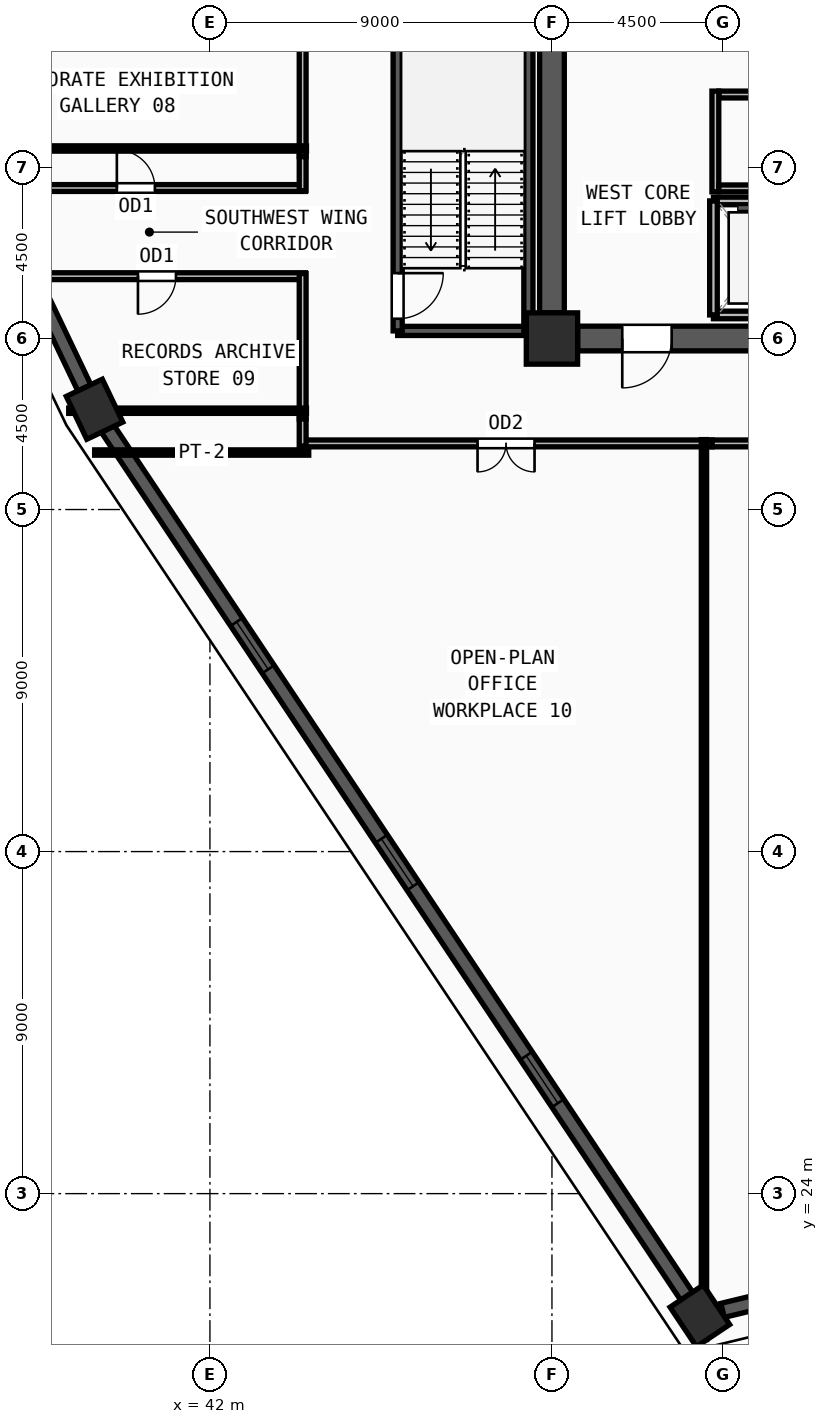
"""IFC4 building model, lengths in metres.
Left out: names, types, materials, properties, quantities, classifications, styles, units other than length and angle.
Written with IfcOpenShell. Run it as: python <this file> out.ifc"""

import sys

from ifc_helpers import new_model, si_unit, direction, frame, frame_2d, origin, origin_2d, place, context, subcontext, project, spatial, rectangle, extrude, source, transform, mapped, element, fill, save


model = new_model("IFC4")
c1 = context("Model", 3, precision=1e-05, world=origin(), true_north=direction((0.0, 1.0)))
c2 = subcontext(c1, "Body", "Model", "MODEL_VIEW")
j1 = project(units=[si_unit("LENGTHUNIT", "METRE"), si_unit("PLANEANGLEUNIT", "RADIAN")], contexts=[c1])
p1 = place(None, origin())
s1 = spatial("IfcSite", under=j1, at=p1, CompositionType="ELEMENT")
p2 = place(p1, origin())
s2 = spatial("IfcBuilding", under=s1, at=p2, CompositionType="ELEMENT")
p3 = place(p2, frame((0.0, 0.0, 270.0)))
s3 = spatial("IfcBuildingStorey", under=s2, at=p3, CompositionType="ELEMENT", Elevation=270.0)
m1 = source(origin(), c2, "Body", "SweptSolid", [
    extrude(rectangle(XDim=1.35, YDim=1.35, at=origin_2d()), origin(), (0.0, 0.0, 1.0), 3.75),
])
p4 = place(p3, frame((51.0, 46.5, 0.0), z_axis=(0.0, 0.0, 1.0), x_axis=(1.0, 0.0, 0.0)))
e1 = element("IfcColumn", 1, at=p4, inside=s3, PredefinedType="COLUMN", context=c2, shape_type="MappedRepresentation", body=[
    mapped(m1, transform((0.0, 0.0, 0.0), x_axis=(1.0, 0.0, 0.0), y_axis=(0.0, 1.0, 0.0), z_axis=(0.0, 0.0, 1.0), scale=1.0)),
])
m2 = source(origin(), c2, "Body", "SweptSolid", [
    extrude(rectangle(XDim=1.25, YDim=1.05, at=origin_2d()), origin(), (0.0, 0.0, 1.0), 3.75),
])
for number, where, z_axis, x_axis in (
    (2, (54.892, 20.784, 0.0), (0.0, 0.0, 1.0), (-0.555, 0.832, 0.0)),
    (3, (38.964, 44.639, 0.0), (0.0, 0.0, 1.0), (-0.431, 0.902, 0.0)),
):
    element("IfcColumn", number, at=place(p3, frame(where, z_axis=z_axis, x_axis=x_axis)), inside=s3, PredefinedType="COLUMN", context=c2, shape_type="MappedRepresentation", body=[
        mapped(m2, transform((0.0, 0.0, 0.0), x_axis=(1.0, 0.0, 0.0), y_axis=(0.0, 1.0, 0.0), z_axis=(0.0, 0.0, 1.0), scale=1.0)),
    ])
p5 = place(p3, frame((28.939, 65.624, 0.0), z_axis=(0.0, 0.0, 1.0), x_axis=(0.431066278959, -0.902320266393, 0.0)))
e4 = element("IfcWall", 4, at=p5, inside=s3, PredefinedType="SOLIDWALL", context=c2, shape_type="SweptSolid", body=[
    extrude(rectangle(XDim=22.642, YDim=0.38, at=frame_2d((11.321, 0.0))), origin(), (0.0, 0.0, 1.0), 3.57),
])
m3 = source(origin(), c2, "Body", "SweptSolid", [
    extrude(rectangle(XDim=1.5, YDim=1.9, at=frame_2d((0.75, 0.95))), frame((0.0, 0.2, 0.0), z_axis=(0.0, -1.0, 0.0), x_axis=(1.0, 0.0, 0.0)), (0.0, 0.0, 1.0), 0.4),
])
p6 = place(p5, frame((4.06, 0.0, 0.55)))
e5 = element("IfcOpeningElement", 5, at=p6, cuts=e4, PredefinedType="OPENING", context=c2, shape_type="MappedRepresentation", body=[
    mapped(m3, transform((0.0, 0.0, 0.0), x_axis=(1.0, 0.0, 0.0), y_axis=(0.0, 1.0, 0.0), z_axis=(0.0, 0.0, 1.0), scale=1.0)),
])
p7 = place(p5, frame((10.571, 0.0, 0.55)))
e6 = element("IfcOpeningElement", 6, at=p7, cuts=e4, PredefinedType="OPENING", context=c2, shape_type="MappedRepresentation", body=[
    mapped(m3, transform((0.0, 0.0, 0.0), x_axis=(1.0, 0.0, 0.0), y_axis=(0.0, 1.0, 0.0), z_axis=(0.0, 0.0, 1.0), scale=1.0)),
])
p8 = place(p3, frame((39.306, 44.128, 0.0), z_axis=(0.0, 0.0, 1.0), x_axis=(0.555258257402, -0.831677983108, 0.0)))
e7 = element("IfcWall", 7, at=p8, inside=s3, PredefinedType="SOLIDWALL", context=c2, shape_type="SweptSolid", body=[
    extrude(rectangle(XDim=27.454, YDim=0.38, at=frame_2d((13.727, 0.0))), origin(), (0.0, 0.0, 1.0), 3.57),
])
p9 = place(p8, frame((6.114, 0.0, 0.55)))
e8 = element("IfcOpeningElement", 8, at=p9, cuts=e7, PredefinedType="OPENING", context=c2, shape_type="MappedRepresentation", body=[
    mapped(m3, transform((0.0, 0.0, 0.0), x_axis=(1.0, 0.0, 0.0), y_axis=(0.0, 1.0, 0.0), z_axis=(0.0, 0.0, 1.0), scale=1.0)),
])
p10 = place(p8, frame((12.977, 0.0, 0.55)))
e9 = element("IfcOpeningElement", 9, at=p10, cuts=e7, PredefinedType="OPENING", context=c2, shape_type="MappedRepresentation", body=[
    mapped(m3, transform((0.0, 0.0, 0.0), x_axis=(1.0, 0.0, 0.0), y_axis=(0.0, 1.0, 0.0), z_axis=(0.0, 0.0, 1.0), scale=1.0)),
])
p11 = place(p8, frame((19.841, 0.0, 0.55)))
e10 = element("IfcOpeningElement", 10, at=p11, cuts=e7, PredefinedType="OPENING", context=c2, shape_type="MappedRepresentation", body=[
    mapped(m3, transform((0.0, 0.0, 0.0), x_axis=(1.0, 0.0, 0.0), y_axis=(0.0, 1.0, 0.0), z_axis=(0.0, 0.0, 1.0), scale=1.0)),
])
p12 = place(p3, frame((55.49, 20.928, 0.0), z_axis=(0.0, 0.0, 1.0), x_axis=(0.972038774705, 0.234820400455, 0.0)))
e11 = element("IfcWall", 11, at=p12, inside=s3, PredefinedType="SOLIDWALL", context=c2, shape_type="SweptSolid", body=[
    extrude(rectangle(XDim=4.025, YDim=0.38, at=frame_2d((2.012, 0.0))), origin(), (0.0, 0.0, 1.0), 3.57),
])
m4 = source(origin(), c2, "Body", "SweptSolid", [
    extrude(rectangle(XDim=1.2, YDim=1.9, at=frame_2d((0.6, 0.95))), frame((0.0, 0.2, 0.0), z_axis=(0.0, -1.0, 0.0), x_axis=(1.0, 0.0, 0.0)), (0.0, 0.0, 1.0), 0.4),
])
p13 = place(p12, frame((1.412, 0.0, 0.55)))
e12 = element("IfcOpeningElement", 12, at=p13, cuts=e11, PredefinedType="OPENING", context=c2, shape_type="MappedRepresentation", body=[
    mapped(m4, transform((0.0, 0.0, 0.0), x_axis=(1.0, 0.0, 0.0), y_axis=(0.0, 1.0, 0.0), z_axis=(0.0, 0.0, 1.0), scale=1.0)),
])
p14 = place(p3, frame((59.325, 46.5, 0.0), z_axis=(0.0, 0.0, 1.0), x_axis=(-1.0, 0.0, 0.0)))
e13 = element("IfcWall", 13, at=p14, inside=s3, PredefinedType="SHEAR", context=c2, shape_type="SweptSolid", body=[
    extrude(rectangle(XDim=7.65, YDim=0.65, at=frame_2d((3.825, 0.0))), origin(), (0.0, 0.0, 1.0), 3.57),
])
m5 = source(origin(), c2, "Body", "SweptSolid", [
    extrude(rectangle(XDim=1.3, YDim=2.2, at=frame_2d((0.65, 1.1))), frame((0.0, 0.335, 0.0), z_axis=(0.0, -1.0, 0.0), x_axis=(1.0, 0.0, 0.0)), (0.0, 0.0, 1.0), 0.67),
])
p15 = place(p14, frame((5.175, 0.0, 0.0)))
e14 = element("IfcOpeningElement", 14, at=p15, cuts=e13, PredefinedType="OPENING", context=c2, shape_type="MappedRepresentation", body=[
    mapped(m5, transform((0.0, 0.0, 0.0), x_axis=(1.0, 0.0, 0.0), y_axis=(0.0, 1.0, 0.0), z_axis=(0.0, 0.0, 1.0), scale=1.0)),
])
m6 = source(origin(), c2, "Body", "SweptSolid", [
    extrude(rectangle(XDim=1.0, YDim=2.2, at=frame_2d((0.5, 1.1))), frame((0.0, 0.335, 0.0), z_axis=(0.0, -1.0, 0.0), x_axis=(1.0, 0.0, 0.0)), (0.0, 0.0, 1.0), 0.67),
])
p16 = place(p14, frame((0.675, 0.0, 0.0)))
e15 = element("IfcOpeningElement", 15, at=p16, cuts=e13, PredefinedType="OPENING", context=c2, shape_type="MappedRepresentation", body=[
    mapped(m6, transform((0.0, 0.0, 0.0), x_axis=(1.0, 0.0, 0.0), y_axis=(0.0, 1.0, 0.0), z_axis=(0.0, 0.0, 1.0), scale=1.0)),
])
p17 = place(p3, frame((51.0, 47.175, 0.0), z_axis=(0.0, 0.0, 1.0), x_axis=(0.0, 1.0, 0.0)))
e16 = element("IfcWall", 16, at=p17, inside=s3, PredefinedType="SHEAR", context=c2, shape_type="SweptSolid", body=[
    extrude(rectangle(XDim=13.65, YDim=0.65, at=frame_2d((6.825, 0.0))), origin(), (0.0, 0.0, 1.0), 3.57),
])
p18 = place(p3, frame((46.94, 46.7, 0.0), z_axis=(0.0, 0.0, 1.0), x_axis=(1.0, 0.0, 0.0)))
e17 = element("IfcWall", 17, at=p18, inside=s3, PredefinedType="SOLIDWALL", context=c2, shape_type="SweptSolid", body=[
    extrude(rectangle(XDim=3.44, YDim=0.24, at=frame_2d((1.72, 0.0))), origin(), (0.0, 0.0, 1.0), 3.57),
])
p19 = place(p3, frame((50.38, 46.7, 0.0), z_axis=(0.0, 0.0, 1.0), x_axis=(0.0, 1.0, 0.0)))
e18 = element("IfcWall", 18, at=p19, inside=s3, PredefinedType="SOLIDWALL", context=c2, shape_type="SweptSolid", body=[
    extrude(rectangle(XDim=7.82, YDim=0.24, at=frame_2d((3.91, 0.0))), origin(), (0.0, 0.0, 1.0), 3.57),
])
p20 = place(p3, frame((46.94, 54.52, 0.0), z_axis=(0.0, 0.0, 1.0), x_axis=(0.0, -1.0, 0.0)))
e19 = element("IfcWall", 19, at=p20, inside=s3, PredefinedType="SOLIDWALL", context=c2, shape_type="SweptSolid", body=[
    extrude(rectangle(XDim=7.82, YDim=0.24, at=frame_2d((3.91, 0.0))), origin(), (0.0, 0.0, 1.0), 3.57),
])
m7 = source(origin(), c2, "Body", "SweptSolid", [
    extrude(rectangle(XDim=1.2, YDim=2.2, at=frame_2d((0.6, 1.1))), frame((0.0, 0.13, 0.0), z_axis=(0.0, -1.0, 0.0), x_axis=(1.0, 0.0, 0.0)), (0.0, 0.0, 1.0), 0.26),
])
p21 = place(p20, frame((6.3, 0.0, 0.0)))
e20 = element("IfcOpeningElement", 20, at=p21, cuts=e19, PredefinedType="OPENING", context=c2, shape_type="MappedRepresentation", body=[
    mapped(m7, transform((0.0, 0.0, 0.0), x_axis=(1.0, 0.0, 0.0), y_axis=(0.0, 1.0, 0.0), z_axis=(0.0, 0.0, 1.0), scale=1.0)),
])
for number, where, z_axis, x_axis in (
    (21, (55.25, 47.12, 0.0), (0.0, 0.0, 1.0), (1.0, 0.0, 0.0)),
    (22, (57.65, 50.12, 0.0), (0.0, 0.0, 1.0), (-1.0, 0.0, 0.0)),
):
    element("IfcWall", number, at=place(p3, frame(where, z_axis=z_axis, x_axis=x_axis)), inside=s3, PredefinedType="SOLIDWALL", context=c2, shape_type="SweptSolid", body=[
        extrude(rectangle(XDim=2.4, YDim=0.2, at=frame_2d((1.2, 0.0))), origin(), (0.0, 0.0, 1.0), 3.57),
    ])
p22 = place(p3, frame((55.25, 50.12, 0.0), z_axis=(0.0, 0.0, 1.0), x_axis=(0.0, -1.0, 0.0)))
e23 = element("IfcWall", 23, at=p22, inside=s3, PredefinedType="SOLIDWALL", context=c2, shape_type="SweptSolid", body=[
    extrude(rectangle(XDim=3.0, YDim=0.2, at=frame_2d((1.5, 0.0))), origin(), (0.0, 0.0, 1.0), 3.57),
])
p23 = place(p3, frame((55.39, 52.92, 0.0), z_axis=(0.0, 0.0, 1.0), x_axis=(1.0, 0.0, 0.0)))
e24 = element("IfcWall", 24, at=p23, inside=s3, PredefinedType="PARTITIONING", context=c2, shape_type="SweptSolid", body=[
    extrude(rectangle(XDim=9.21, YDim=0.18, at=frame_2d((4.605, 0.0))), origin(), (0.0, 0.0, 1.0), 3.57),
])
m8 = source(origin(), c2, "Body", "SweptSolid", [
    extrude(rectangle(XDim=0.85, YDim=2.1, at=frame_2d((0.425, 1.05))), frame((0.0, 0.1, 0.0), z_axis=(0.0, -1.0, 0.0), x_axis=(1.0, 0.0, 0.0)), (0.0, 0.0, 1.0), 0.2),
])
p24 = place(p23, frame((4.185, 0.0, 0.0)))
e25 = element("IfcOpeningElement", 25, at=p24, cuts=e24, PredefinedType="OPENING", context=c2, shape_type="MappedRepresentation", body=[
    mapped(m8, transform((0.0, 0.0, 0.0), x_axis=(1.0, 0.0, 0.0), y_axis=(0.0, 1.0, 0.0), z_axis=(0.0, 0.0, 1.0), scale=1.0)),
])
p25 = place(p3, frame((44.44, 51.285, 0.0), z_axis=(0.0, 0.0, 1.0), x_axis=(0.0, 1.0, 0.0)))
e26 = element("IfcWall", 26, at=p25, inside=s3, PredefinedType="PARTITIONING", context=c2, shape_type="SweptSolid", body=[
    extrude(rectangle(XDim=8.0, YDim=0.18, at=frame_2d((4.0, 0.0))), origin(), (0.0, 0.0, 1.0), 3.205),
])
m9 = source(origin(), c2, "Body", "SweptSolid", [
    extrude(rectangle(XDim=1.0, YDim=2.2, at=frame_2d((0.5, 1.1))), frame((0.0, 0.1, 0.0), z_axis=(0.0, -1.0, 0.0), x_axis=(1.0, 0.0, 0.0)), (0.0, 0.0, 1.0), 0.2),
])
p26 = place(p25, frame((3.5, 0.0, 0.0)))
e27 = element("IfcOpeningElement", 27, at=p26, cuts=e26, PredefinedType="OPENING", context=c2, shape_type="MappedRepresentation", body=[
    mapped(m9, transform((0.0, 0.0, 0.0), x_axis=(1.0, 0.0, 0.0), y_axis=(0.0, 1.0, 0.0), z_axis=(0.0, 0.0, 1.0), scale=1.0)),
])
p27 = place(p3, frame((35.592, 50.46, 0.0), z_axis=(0.0, 0.0, 1.0), x_axis=(1.0, 0.0, 0.0)))
e28 = element("IfcWall", 28, at=p27, inside=s3, PredefinedType="PARTITIONING", context=c2, shape_type="SweptSolid", body=[
    extrude(rectangle(XDim=8.918, YDim=0.18, at=frame_2d((4.459, 0.0))), origin(), (0.0, 0.0, 1.0), 3.57),
])
p28 = place(p27, frame((3.959, 0.0, 0.0)))
e29 = element("IfcOpeningElement", 29, at=p28, cuts=e28, PredefinedType="OPENING", context=c2, shape_type="MappedRepresentation", body=[
    mapped(m9, transform((0.0, 0.0, 0.0), x_axis=(1.0, 0.0, 0.0), y_axis=(0.0, 1.0, 0.0), z_axis=(0.0, 0.0, 1.0), scale=1.0)),
])
p29 = place(p3, frame((44.51, 48.14, 0.0), z_axis=(0.0, 0.0, 1.0), x_axis=(-1.0, 0.0, 0.0)))
e30 = element("IfcWall", 30, at=p29, inside=s3, PredefinedType="PARTITIONING", context=c2, shape_type="SweptSolid", body=[
    extrude(rectangle(XDim=7.809, YDim=0.18, at=frame_2d((3.905, 0.0))), origin(), (0.0, 0.0, 1.0), 3.57),
])
p30 = place(p29, frame((3.404, 0.0, 0.0)))
e31 = element("IfcOpeningElement", 31, at=p30, cuts=e30, PredefinedType="OPENING", context=c2, shape_type="MappedRepresentation", body=[
    mapped(m9, transform((0.0, 0.0, 0.0), x_axis=(1.0, 0.0, 0.0), y_axis=(0.0, 1.0, 0.0), z_axis=(0.0, 0.0, 1.0), scale=1.0)),
])
p31 = place(p3, frame((55.215, 43.74, 0.0), z_axis=(0.0, 0.0, 1.0), x_axis=(-1.0, 0.0, 0.0)))
e32 = element("IfcWall", 32, at=p31, inside=s3, PredefinedType="PARTITIONING", context=c2, shape_type="SweptSolid", body=[
    extrude(rectangle(XDim=10.845, YDim=0.18, at=frame_2d((5.422, 0.0))), origin(), (0.0, 0.0, 1.0), 3.57),
])
m10 = source(origin(), c2, "Body", "SweptSolid", [
    extrude(rectangle(XDim=1.5, YDim=2.2, at=frame_2d((0.75, 1.1))), frame((0.0, 0.1, 0.0), z_axis=(0.0, -1.0, 0.0), x_axis=(1.0, 0.0, 0.0)), (0.0, 0.0, 1.0), 0.2),
])
p32 = place(p31, frame((4.673, 0.0, 0.0)))
e33 = element("IfcOpeningElement", 33, at=p32, cuts=e32, PredefinedType="OPENING", context=c2, shape_type="MappedRepresentation", body=[
    mapped(m10, transform((0.0, 0.0, 0.0), x_axis=(1.0, 0.0, 0.0), y_axis=(0.0, 1.0, 0.0), z_axis=(0.0, 0.0, 1.0), scale=1.0)),
])
p33 = place(p3, frame((75.63, 43.74, 0.0), z_axis=(0.0, 0.0, 1.0), x_axis=(-1.0, 0.0, 0.0)))
e34 = element("IfcWall", 34, at=p33, inside=s3, PredefinedType="PARTITIONING", context=c2, shape_type="SweptSolid", body=[
    extrude(rectangle(XDim=20.415, YDim=0.18, at=frame_2d((10.208, 0.0))), origin(), (0.0, 0.0, 1.0), 3.57),
])
p34 = place(p33, frame((9.457, 0.0, 0.0)))
e35 = element("IfcOpeningElement", 35, at=p34, cuts=e34, PredefinedType="OPENING", context=c2, shape_type="MappedRepresentation", body=[
    mapped(m10, transform((0.0, 0.0, 0.0), x_axis=(1.0, 0.0, 0.0), y_axis=(0.0, 1.0, 0.0), z_axis=(0.0, 0.0, 1.0), scale=1.0)),
])
p35 = place(p3, frame((44.44, 50.39, 0.0), z_axis=(0.0, 0.0, 1.0), x_axis=(0.0, 1.0, 0.0)))
e36 = element("IfcWall", 36, at=p35, inside=s3, PredefinedType="PARTITIONING", context=c2, shape_type="SweptSolid", body=[
    extrude(rectangle(XDim=0.895, YDim=0.18, at=frame_2d((0.448, 0.0))), origin(), (0.0, 0.0, 1.0), 3.57),
])
p36 = place(p3, frame((44.44, 44.385, 0.0), z_axis=(0.0, 0.0, 1.0), x_axis=(0.0, 1.0, 0.0)))
e37 = element("IfcWall", 37, at=p36, inside=s3, PredefinedType="PARTITIONING", context=c2, shape_type="SweptSolid", body=[
    extrude(rectangle(XDim=3.825, YDim=0.18, at=frame_2d((1.913, 0.0))), origin(), (0.0, 0.0, 1.0), 3.57),
])
p37 = place(p3, frame((44.44, 43.67, 0.0), z_axis=(0.0, 0.0, 1.0), x_axis=(0.0, 1.0, 0.0)))
e38 = element("IfcWall", 38, at=p37, inside=s3, PredefinedType="PARTITIONING", context=c2, shape_type="SweptSolid", body=[
    extrude(rectangle(XDim=0.715, YDim=0.18, at=frame_2d((0.357, 0.0))), origin(), (0.0, 0.0, 1.0), 3.57),
])
p38 = place(p3, frame((44.6, 43.5, 0.0), z_axis=(0.0, 0.0, 1.0), x_axis=(-1.0, 0.0, 0.0)))
e39 = element("IfcWall", 39, at=p38, inside=s3, PredefinedType="PARTITIONING", context=c2, shape_type="SweptSolid", body=[
    extrude(rectangle(XDim=5.633, YDim=0.14, at=frame_2d((2.816, 0.0))), origin(), (0.0, 0.0, 1.0), 3.57),
])
p39 = place(p3, frame((44.54, 44.6, 0.0), z_axis=(0.0, 0.0, 1.0), x_axis=(-1.0, 0.0, 0.0)))
e40 = element("IfcWall", 40, at=p39, inside=s3, PredefinedType="PARTITIONING", context=c2, shape_type="SweptSolid", body=[
    extrude(rectangle(XDim=6.256, YDim=0.14, at=frame_2d((3.128, 0.0))), origin(), (0.0, 0.0, 1.0), 3.57),
])
p40 = place(p3, frame((44.54, 51.5, 0.0), z_axis=(0.0, 0.0, 1.0), x_axis=(-1.0, 0.0, 0.0)))
e41 = element("IfcWall", 41, at=p40, inside=s3, PredefinedType="PARTITIONING", context=c2, shape_type="SweptSolid", body=[
    extrude(rectangle(XDim=9.552, YDim=0.14, at=frame_2d((4.776, 0.0))), origin(), (0.0, 0.0, 1.0), 3.57),
])
p41 = place(p3, frame((55.0, 43.84, 0.0), z_axis=(0.0, 0.0, 1.0), x_axis=(0.0, -1.0, 0.0)))
e42 = element("IfcWall", 42, at=p41, inside=s3, PredefinedType="PARTITIONING", context=c2, shape_type="SweptSolid", body=[
    extrude(rectangle(XDim=23.679, YDim=0.14, at=frame_2d((11.84, 0.0))), origin(), (0.0, 0.0, 1.0), 2.855),
])
p42 = place(p3, frame((55.3, 50.36, 0.0), z_axis=(0.0, 0.0, 1.0), x_axis=(0.0, 1.0, 0.0)))
e43 = element("IfcWall", 43, at=p42, inside=s3, PredefinedType="PARTITIONING", context=c2, shape_type="SweptSolid", body=[
    extrude(rectangle(XDim=2.65, YDim=0.18, at=frame_2d((1.325, 0.0))), origin(), (0.0, 0.0, 1.0), 3.57),
])
p43 = place(p3, frame((55.39, 50.45, 0.0), z_axis=(0.0, 0.0, 1.0), x_axis=(1.0, 0.0, 0.0)))
e44 = element("IfcWall", 44, at=p43, inside=s3, PredefinedType="PARTITIONING", context=c2, shape_type="SweptSolid", body=[
    extrude(rectangle(XDim=9.21, YDim=0.18, at=frame_2d((4.605, 0.0))), origin(), (0.0, 0.0, 1.0), 3.57),
])
m11 = source(origin(), c2, "Body", "SweptSolid", [
    extrude(rectangle(XDim=1.5, YDim=1.9, at=frame_2d((0.75, 0.95))), frame((0.0, 0.03, 0.0), z_axis=(0.0, -1.0, 0.0), x_axis=(1.0, 0.0, 0.0)), (0.0, 0.0, 1.0), 0.06),
])
p44 = place(p9, origin())
e45 = element("IfcWindow", 45, at=p44, inside=s3, PartitioningType="DOUBLE_PANEL_VERTICAL", PredefinedType="WINDOW", context=c2, shape_type="MappedRepresentation", body=[
    mapped(m11, transform((0.0, 0.0, 0.0), x_axis=(1.0, 0.0, 0.0), y_axis=(0.0, 1.0, 0.0), z_axis=(0.0, 0.0, 1.0), scale=1.0)),
])
fill(e8, e45)
p45 = place(p10, origin())
e46 = element("IfcWindow", 46, at=p45, inside=s3, PartitioningType="DOUBLE_PANEL_VERTICAL", PredefinedType="WINDOW", context=c2, shape_type="MappedRepresentation", body=[
    mapped(m11, transform((0.0, 0.0, 0.0), x_axis=(1.0, 0.0, 0.0), y_axis=(0.0, 1.0, 0.0), z_axis=(0.0, 0.0, 1.0), scale=1.0)),
])
fill(e9, e46)
p46 = place(p11, origin())
e47 = element("IfcWindow", 47, at=p46, inside=s3, PartitioningType="DOUBLE_PANEL_VERTICAL", PredefinedType="WINDOW", context=c2, shape_type="MappedRepresentation", body=[
    mapped(m11, transform((0.0, 0.0, 0.0), x_axis=(1.0, 0.0, 0.0), y_axis=(0.0, 1.0, 0.0), z_axis=(0.0, 0.0, 1.0), scale=1.0)),
])
fill(e10, e47)
m12 = source(origin(), c2, "Body", "SweptSolid", [
    extrude(rectangle(XDim=1.3, YDim=2.2, at=frame_2d((0.65, 1.1))), frame((0.0, 0.025, 0.0), z_axis=(0.0, -1.0, 0.0), x_axis=(1.0, 0.0, 0.0)), (0.0, 0.0, 1.0), 0.05),
])
p47 = place(p15, origin())
e48 = element("IfcDoor", 48, at=p47, inside=s3, OperationType="SINGLE_SWING_RIGHT", PredefinedType="DOOR", context=c2, shape_type="MappedRepresentation", body=[
    mapped(m12, transform((0.0, 0.0, 0.0), x_axis=(1.0, 0.0, 0.0), y_axis=(0.0, 1.0, 0.0), z_axis=(0.0, 0.0, 1.0), scale=1.0)),
])
fill(e14, e48)
m13 = source(origin(), c2, "Body", "SweptSolid", [
    extrude(rectangle(XDim=1.2, YDim=2.2, at=frame_2d((0.6, 1.1))), frame((0.0, 0.025, 0.0), z_axis=(0.0, -1.0, 0.0), x_axis=(1.0, 0.0, 0.0)), (0.0, 0.0, 1.0), 0.05),
])
p48 = place(p21, origin())
e49 = element("IfcDoor", 49, at=p48, inside=s3, OperationType="SINGLE_SWING_LEFT", PredefinedType="DOOR", context=c2, shape_type="MappedRepresentation", body=[
    mapped(m13, transform((0.0, 0.0, 0.0), x_axis=(1.0, 0.0, 0.0), y_axis=(0.0, 1.0, 0.0), z_axis=(0.0, 0.0, 1.0), scale=1.0)),
])
fill(e20, e49)
m14 = source(origin(), c2, "Body", "SweptSolid", [
    extrude(rectangle(XDim=1.0, YDim=2.2, at=frame_2d((0.5, 1.1))), frame((0.0, 0.025, 0.0), z_axis=(0.0, -1.0, 0.0), x_axis=(1.0, 0.0, 0.0)), (0.0, 0.0, 1.0), 0.05),
])
p49 = place(p28, origin())
e50 = element("IfcDoor", 50, at=p49, inside=s3, OperationType="SINGLE_SWING_LEFT", PredefinedType="DOOR", context=c2, shape_type="MappedRepresentation", body=[
    mapped(m14, transform((0.0, 0.0, 0.0), x_axis=(1.0, 0.0, 0.0), y_axis=(0.0, 1.0, 0.0), z_axis=(0.0, 0.0, 1.0), scale=1.0)),
])
fill(e29, e50)
p50 = place(p30, origin())
e51 = element("IfcDoor", 51, at=p50, inside=s3, OperationType="SINGLE_SWING_RIGHT", PredefinedType="DOOR", context=c2, shape_type="MappedRepresentation", body=[
    mapped(m14, transform((0.0, 0.0, 0.0), x_axis=(1.0, 0.0, 0.0), y_axis=(0.0, 1.0, 0.0), z_axis=(0.0, 0.0, 1.0), scale=1.0)),
])
fill(e31, e51)
m15 = source(origin(), c2, "Body", "SweptSolid", [
    extrude(rectangle(XDim=1.5, YDim=2.2, at=frame_2d((0.75, 1.1))), frame((0.0, 0.025, 0.0), z_axis=(0.0, -1.0, 0.0), x_axis=(1.0, 0.0, 0.0)), (0.0, 0.0, 1.0), 0.05),
])
p51 = place(p32, origin())
e52 = element("IfcDoor", 52, at=p51, inside=s3, OperationType="DOUBLE_DOOR_SINGLE_SWING", PredefinedType="DOOR", context=c2, shape_type="MappedRepresentation", body=[
    mapped(m15, transform((0.0, 0.0, 0.0), x_axis=(1.0, 0.0, 0.0), y_axis=(0.0, 1.0, 0.0), z_axis=(0.0, 0.0, 1.0), scale=1.0)),
])
fill(e33, e52)
save(model, sys.argv[1])
